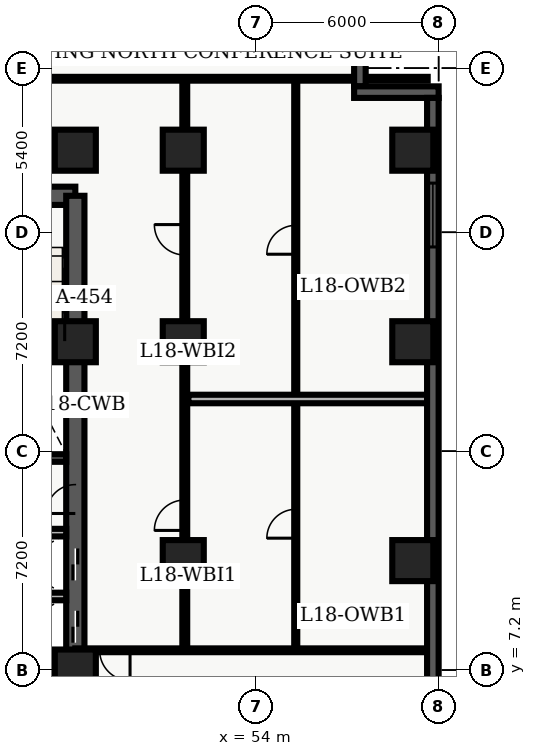
"""IFC4 building model, lengths in metres.
Left out: names, types, materials, properties, quantities, classifications, styles, units other than length and angle.
Written with IfcOpenShell. Run it as: python <this file> out.ifc"""

import sys

from ifc_helpers import new_model, entity, si_unit, converted_unit, direction, frame, origin_with_axes, origin_2d_with_axis, place, context, subcontext, project, spatial, polyline, rectangle, outline, extrude, element, fill, save


model = new_model("IFC4")
c1 = context("Model", 3, precision=1e-05, world=origin_with_axes(), true_north=direction((0.0, 1.0)))
c2 = subcontext(c1, "Body", "Model", "MODEL_VIEW")
j1 = project(units=[si_unit("LENGTHUNIT", "METRE"), converted_unit("PLANEANGLEUNIT", "DEGREE", entity("IfcPlaneAngleMeasure", 0.017), si_unit("PLANEANGLEUNIT", "RADIAN"), dimensions=[0, 0, 0, 0, 0, 0, 0])], contexts=[c1])
p1 = place(None, origin_with_axes())
s1 = spatial("IfcSite", under=j1, at=p1, CompositionType="ELEMENT")
p2 = place(p1, origin_with_axes())
s2 = spatial("IfcBuilding", under=s1, at=p2, CompositionType="ELEMENT")
p3 = place(p2, frame((0.0, 0.0, 75.6), z_axis=(0.0, 0.0, 1.0), x_axis=(1.0, 0.0, 0.0)))
s3 = spatial("IfcBuildingStorey", under=s2, at=p3, CompositionType="ELEMENT", Elevation=75.6)
p4 = place(p3, frame((40.2, 7.2, 0.0), z_axis=(0.0, 0.0, 1.0), x_axis=(1.0, 0.0, 0.0)))
e1 = element("IfcWall", 1, at=p4, inside=s3, PredefinedType="SHEAR", context=c2, shape_type="SweptSolid", body=[
    extrude(outline(polyline([(0.0, -0.3), (7.85, -0.3), (7.85, 0.3), (0.0, 0.3), (0.0, -0.3)])), origin_with_axes(), (0.0, 0.0, 1.0), 3.6),
])
p5 = place(p4, frame((2.175, 0.0, 0.0), z_axis=(0.0, 0.0, 1.0), x_axis=(1.0, 0.0, 0.0)))
e2 = element("IfcOpeningElement", 2, at=p5, cuts=e1, PredefinedType="OPENING", context=c2, shape_type="SweptSolid", body=[
    extrude(rectangle(XDim=1.05, YDim=0.62, at=origin_2d_with_axis()), origin_with_axes(), (0.0, 0.0, 1.0), 2.15),
])
p6 = place(p3, frame((40.2, 22.8, 0.0), z_axis=(0.0, 0.0, 1.0), x_axis=(1.0, 0.0, 0.0)))
e3 = element("IfcWall", 3, at=p6, inside=s3, PredefinedType="SHEAR", context=c2, shape_type="SweptSolid", body=[
    extrude(outline(polyline([(0.0, -0.3), (7.85, -0.3), (7.85, 0.3), (0.0, 0.3), (0.0, -0.3)])), origin_with_axes(), (0.0, 0.0, 1.0), 3.6),
])
p7 = place(p6, frame((5.775, 0.0, 0.0), z_axis=(0.0, 0.0, 1.0), x_axis=(1.0, 0.0, 0.0)))
e4 = element("IfcOpeningElement", 4, at=p7, cuts=e3, PredefinedType="OPENING", context=c2, shape_type="SweptSolid", body=[
    extrude(rectangle(XDim=1.05, YDim=0.62, at=origin_2d_with_axis()), origin_with_axes(), (0.0, 0.0, 1.0), 2.15),
])
p8 = place(p6, frame((2.15, 0.0, 0.0), z_axis=(0.0, 0.0, 1.0), x_axis=(1.0, 0.0, 0.0)))
e5 = element("IfcOpeningElement", 5, at=p8, cuts=e3, PredefinedType="OPENING", context=c2, shape_type="SweptSolid", body=[
    extrude(rectangle(XDim=0.9, YDim=0.62, at=origin_2d_with_axis()), origin_with_axes(), (0.0, 0.0, 1.0), 2.15),
])
p9 = place(p3, frame((48.05, 7.2, 0.0), z_axis=(0.0, 0.0, 1.0), x_axis=(0.0, 1.0, 0.0)))
e6 = element("IfcWall", 6, at=p9, inside=s3, PredefinedType="SHEAR", context=c2, shape_type="SweptSolid", body=[
    extrude(outline(polyline([(0.0, -0.3), (15.6, -0.3), (15.6, 0.3), (0.0, 0.3), (0.0, -0.3)])), origin_with_axes(), (0.0, 0.0, 1.0), 3.6),
])
p10 = place(p9, frame((1.425, 0.0, 0.0), z_axis=(0.0, 0.0, 1.0), x_axis=(1.0, 0.0, 0.0)))
e7 = element("IfcOpeningElement", 7, at=p10, cuts=e6, PredefinedType="OPENING", context=c2, shape_type="SweptSolid", body=[
    extrude(rectangle(XDim=1.05, YDim=0.62, at=origin_2d_with_axis()), origin_with_axes(), (0.0, 0.0, 1.0), 2.15),
])
p11 = place(p9, frame((3.475, 0.0, 0.0), z_axis=(0.0, 0.0, 1.0), x_axis=(1.0, 0.0, 0.0)))
e8 = element("IfcOpeningElement", 8, at=p11, cuts=e6, PredefinedType="OPENING", context=c2, shape_type="SweptSolid", body=[
    extrude(rectangle(XDim=1.05, YDim=0.62, at=origin_2d_with_axis()), origin_with_axes(), (0.0, 0.0, 1.0), 2.15),
])
p12 = place(p9, frame((5.625, 0.0, 0.0), z_axis=(0.0, 0.0, 1.0), x_axis=(1.0, 0.0, 0.0)))
e9 = element("IfcOpeningElement", 9, at=p12, cuts=e6, PredefinedType="OPENING", context=c2, shape_type="SweptSolid", body=[
    extrude(rectangle(XDim=0.95, YDim=0.62, at=origin_2d_with_axis()), origin_with_axes(), (0.0, 0.0, 1.0), 2.15),
])
p13 = place(p3, frame((44.25, 14.175, 0.0), z_axis=(0.0, 0.0, 1.0), x_axis=(1.0, 0.0, 0.0)))
e10 = element("IfcWall", 10, at=p13, inside=s3, PredefinedType="SHEAR", context=c2, shape_type="SweptSolid", body=[
    extrude(outline(polyline([(0.0, -0.125), (3.5, -0.125), (3.5, 0.125), (0.0, 0.125), (0.0, -0.125)])), origin_with_axes(), (0.0, 0.0, 1.0), 3.6),
])
for number, where, z_axis, x_axis in (
    (11, (48.05, 7.2, 0.0), (0.0, 0.0, 1.0), (1.0, 0.0, 0.0)),
    (12, (48.05, 18.0, 0.0), (0.0, 0.0, 1.0), (1.0, 0.0, 0.0)),
    (13, (48.05, 24.3, 0.0), (0.0, 0.0, 1.0), (1.0, 0.0, 0.0)),
    (14, (51.6, 10.8, 0.0), (0.0, 0.0, 1.0), (1.0, 0.0, 0.0)),
    (15, (51.6, 18.0, 0.0), (0.0, 0.0, 1.0), (1.0, 0.0, 0.0)),
    (16, (51.6, 24.3, 0.0), (0.0, 0.0, 1.0), (1.0, 0.0, 0.0)),
    (17, (59.15, 10.8, 0.0), (0.0, 0.0, 1.0), (1.0, 0.0, 0.0)),
    (18, (59.15, 18.0, 0.0), (0.0, 0.0, 1.0), (1.0, 0.0, 0.0)),
    (19, (59.15, 24.3, 0.0), (0.0, 0.0, 1.0), (1.0, 0.0, 0.0)),
):
    element("IfcColumn", number, at=place(p3, frame(where, z_axis=z_axis, x_axis=x_axis)), inside=s3, PredefinedType="COLUMN", context=c2, shape_type="SweptSolid", body=[
        extrude(rectangle(XDim=1.35, YDim=1.35, at=origin_2d_with_axis()), origin_with_axes(), (0.0, 0.0, 1.0), 3.9),
    ])
for number, where, z_axis, x_axis in (
    (20, (44.25, 9.62, 0.0), (0.0, 0.0, 1.0), (1.0, 0.0, 0.0)),
    (21, (44.25, 11.72, 0.0), (0.0, 0.0, 1.0), (1.0, 0.0, 0.0)),
):
    element("IfcWall", number, at=place(p3, frame(where, z_axis=z_axis, x_axis=x_axis)), inside=s3, PredefinedType="SOLIDWALL", context=c2, shape_type="SweptSolid", body=[
        extrude(outline(polyline([(0.0, -0.125), (3.5, -0.125), (3.5, 0.125), (0.0, 0.125), (0.0, -0.125)])), origin_with_axes(), (0.0, 0.0, 1.0), 2.64),
    ])
p14 = place(p3, frame((51.65, 7.85, 0.0), z_axis=(0.0, 0.0, 1.0), x_axis=(0.0, 1.0, 0.0)))
e22 = element("IfcWall", 22, at=p14, inside=s3, PredefinedType="PARTITIONING", context=c2, shape_type="SweptSolid", body=[
    extrude(outline(polyline([(0.0, -0.08), (18.8, -0.08), (18.8, 0.08), (0.0, 0.08), (0.0, -0.08)])), origin_with_axes(), (0.0, 0.0, 1.0), 2.64),
])
p15 = place(p14, frame((4.443, 0.0, 0.0), z_axis=(0.0, 0.0, 1.0), x_axis=(1.0, 0.0, 0.0)))
e23 = element("IfcOpeningElement", 23, at=p15, cuts=e22, PredefinedType="OPENING", context=c2, shape_type="SweptSolid", body=[
    extrude(rectangle(XDim=1.0, YDim=0.18, at=origin_2d_with_axis()), origin_with_axes(), (0.0, 0.0, 1.0), 2.15),
])
p16 = place(p14, frame((13.503, 0.0, 0.0), z_axis=(0.0, 0.0, 1.0), x_axis=(1.0, 0.0, 0.0)))
e24 = element("IfcOpeningElement", 24, at=p16, cuts=e22, PredefinedType="OPENING", context=c2, shape_type="SweptSolid", body=[
    extrude(rectangle(XDim=1.0, YDim=0.18, at=origin_2d_with_axis()), origin_with_axes(), (0.0, 0.0, 1.0), 2.15),
])
p17 = place(p3, frame((59.64, 7.85, 0.0), z_axis=(0.0, 0.0, 1.0), x_axis=(-1.0, 0.0, 0.0)))
e25 = element("IfcWall", 25, at=p17, inside=s3, PredefinedType="PARTITIONING", context=c2, shape_type="SweptSolid", body=[
    extrude(outline(polyline([(0.0, -0.062), (11.59, -0.062), (11.59, 0.062), (0.0, 0.062), (0.0, -0.062)])), origin_with_axes(), (0.0, 0.0, 1.0), 2.64),
])
p18 = place(p17, frame((10.29, 0.0, 0.0), z_axis=(0.0, 0.0, 1.0), x_axis=(1.0, 0.0, 0.0)))
e26 = element("IfcOpeningElement", 26, at=p18, cuts=e25, PredefinedType="OPENING", context=c2, shape_type="SweptSolid", body=[
    extrude(rectangle(XDim=1.0, YDim=0.145, at=origin_2d_with_axis()), origin_with_axes(), (0.0, 0.0, 1.0), 2.15),
])
p19 = place(p3, frame((38.76, 26.65, 0.0), z_axis=(0.0, 0.0, 1.0), x_axis=(1.0, 0.0, 0.0)))
e27 = element("IfcWall", 27, at=p19, inside=s3, PredefinedType="PARTITIONING", context=c2, shape_type="SweptSolid", body=[
    extrude(outline(polyline([(0.0, -0.062), (20.88, -0.062), (20.88, 0.062), (0.0, 0.062), (0.0, -0.062)])), origin_with_axes(), (0.0, 0.0, 1.0), 2.64),
])
p20 = place(p19, frame((4.24, 0.0, 0.0), z_axis=(0.0, 0.0, 1.0), x_axis=(1.0, 0.0, 0.0)))
e28 = element("IfcOpeningElement", 28, at=p20, cuts=e27, PredefinedType="OPENING", context=c2, shape_type="SweptSolid", body=[
    extrude(rectangle(XDim=1.0, YDim=0.145, at=origin_2d_with_axis()), origin_with_axes(), (0.0, 0.0, 1.0), 2.15),
])
p21 = place(p3, frame((55.3, 7.98, 0.0), z_axis=(0.0, 0.0, 1.0), x_axis=(0.0, 1.0, 0.0)))
e29 = element("IfcWall", 29, at=p21, inside=s3, PredefinedType="PARTITIONING", context=c2, shape_type="SweptSolid", body=[
    extrude(outline(polyline([(0.0, -0.05), (18.54, -0.05), (18.54, 0.05), (0.0, 0.05), (0.0, -0.05)])), origin_with_axes(), (0.0, 0.0, 1.0), 2.64),
])
p22 = place(p21, frame((4.033, 0.0, 0.0), z_axis=(0.0, 0.0, 1.0), x_axis=(1.0, 0.0, 0.0)))
e30 = element("IfcOpeningElement", 30, at=p22, cuts=e29, PredefinedType="OPENING", context=c2, shape_type="SweptSolid", body=[
    extrude(rectangle(XDim=0.95, YDim=0.12, at=origin_2d_with_axis()), origin_with_axes(), (0.0, 0.0, 1.0), 2.15),
])
p23 = place(p21, frame((13.373, 0.0, 0.0), z_axis=(0.0, 0.0, 1.0), x_axis=(1.0, 0.0, 0.0)))
e31 = element("IfcOpeningElement", 31, at=p23, cuts=e29, PredefinedType="OPENING", context=c2, shape_type="SweptSolid", body=[
    extrude(rectangle(XDim=0.95, YDim=0.12, at=origin_2d_with_axis()), origin_with_axes(), (0.0, 0.0, 1.0), 2.15),
])
p24 = place(p3, frame((51.77, 16.116, 0.0), z_axis=(0.0, 0.0, 1.0), x_axis=(1.0, 0.0, 0.0)))
e32 = element("IfcWall", 32, at=p24, inside=s3, PredefinedType="PARTITIONING", context=c2, shape_type="SweptSolid", body=[
    extrude(outline(polyline([(0.0, -0.14), (7.855, -0.14), (7.855, 0.14), (0.0, 0.14), (0.0, -0.14)])), origin_with_axes(), (0.0, 0.0, 1.0), 2.64),
])
p25 = place(p3, frame((57.41, 28.42, 0.0), z_axis=(0.0, 0.0, 1.0), x_axis=(0.0, -1.0, 0.0)))
e33 = element("IfcWall", 33, at=p25, inside=s3, PredefinedType="SOLIDWALL", context=c2, shape_type="SweptSolid", body=[
    extrude(outline(polyline([(0.0, -0.19), (2.02, -0.19), (2.02, 0.19), (0.0, 0.19), (0.0, -0.19)])), origin_with_axes(), (0.0, 0.0, 1.0), 3.6),
])
p26 = place(p3, frame((57.22, 26.21, 0.0), z_axis=(0.0, 0.0, 1.0), x_axis=(1.0, 0.0, 0.0)))
e34 = element("IfcWall", 34, at=p26, inside=s3, PredefinedType="SOLIDWALL", context=c2, shape_type="SweptSolid", body=[
    extrude(outline(polyline([(0.0, -0.19), (2.78, -0.19), (2.78, 0.19), (0.0, 0.19), (0.0, -0.19)])), origin_with_axes(), (0.0, 0.0, 1.0), 3.6),
])
p27 = place(p3, frame((59.81, 26.02, 0.0), z_axis=(0.0, 0.0, 1.0), x_axis=(0.0, -1.0, 0.0)))
e35 = element("IfcWall", 35, at=p27, inside=s3, PredefinedType="SOLIDWALL", context=c2, shape_type="SweptSolid", body=[
    extrude(outline(polyline([(0.0, -0.19), (23.62, -0.19), (23.62, 0.19), (0.0, 0.19), (0.0, -0.19)])), origin_with_axes(), (0.0, 0.0, 1.0), 3.6),
])
p28 = place(p27, frame((3.853, 0.0, 0.45), z_axis=(0.0, 0.0, 1.0), x_axis=(1.0, 0.0, 0.0)))
e36 = element("IfcOpeningElement", 36, at=p28, cuts=e35, PredefinedType="OPENING", context=c2, shape_type="SweptSolid", body=[
    extrude(rectangle(XDim=2.1, YDim=0.4, at=origin_2d_with_axis()), origin_with_axes(), (0.0, 0.0, 1.0), 2.2),
])
p29 = place(p27, frame((20.218, 0.0, 0.45), z_axis=(0.0, 0.0, 1.0), x_axis=(1.0, 0.0, 0.0)))
e37 = element("IfcOpeningElement", 37, at=p29, cuts=e35, PredefinedType="OPENING", context=c2, shape_type="SweptSolid", body=[
    extrude(rectangle(XDim=2.1, YDim=0.4, at=origin_2d_with_axis()), origin_with_axes(), (0.0, 0.0, 1.0), 2.2),
])
p30 = place(p9, frame((1.425, 0.0, 0.0), z_axis=(0.0, 0.0, 1.0), x_axis=(1.0, 0.0, 0.0)))
e38 = element("IfcDoor", 38, at=p30, inside=s3, OperationType="SLIDING_TO_LEFT", PredefinedType="DOOR", context=c2, shape_type="SweptSolid", body=[
    extrude(rectangle(XDim=1.05, YDim=0.09, at=origin_2d_with_axis()), origin_with_axes(), (0.0, 0.0, 1.0), 2.15),
])
fill(e7, e38)
p31 = place(p9, frame((3.475, 0.0, 0.0), z_axis=(0.0, 0.0, 1.0), x_axis=(1.0, 0.0, 0.0)))
e39 = element("IfcDoor", 39, at=p31, inside=s3, OperationType="SLIDING_TO_RIGHT", PredefinedType="DOOR", context=c2, shape_type="SweptSolid", body=[
    extrude(rectangle(XDim=1.05, YDim=0.09, at=origin_2d_with_axis()), origin_with_axes(), (0.0, 0.0, 1.0), 2.15),
])
fill(e8, e39)
p32 = place(p9, frame((5.625, 0.0, 0.0), z_axis=(0.0, 0.0, 1.0), x_axis=(1.0, 0.0, 0.0)))
e40 = element("IfcDoor", 40, at=p32, inside=s3, OperationType="SINGLE_SWING_LEFT", PredefinedType="DOOR", context=c2, shape_type="SweptSolid", body=[
    extrude(rectangle(XDim=0.95, YDim=0.09, at=origin_2d_with_axis()), origin_with_axes(), (0.0, 0.0, 1.0), 2.15),
])
fill(e9, e40)
p33 = place(p17, frame((10.29, 0.0, 0.0), z_axis=(0.0, 0.0, 1.0), x_axis=(1.0, 0.0, 0.0)))
e41 = element("IfcDoor", 41, at=p33, inside=s3, OperationType="SINGLE_SWING_LEFT", PredefinedType="DOOR", context=c2, shape_type="SweptSolid", body=[
    extrude(rectangle(XDim=1.0, YDim=0.075, at=origin_2d_with_axis()), origin_with_axes(), (0.0, 0.0, 1.0), 2.15),
])
fill(e26, e41)
p34 = place(p21, frame((4.033, 0.0, 0.0), z_axis=(0.0, 0.0, 1.0), x_axis=(1.0, 0.0, 0.0)))
e42 = element("IfcDoor", 42, at=p34, inside=s3, OperationType="SINGLE_SWING_LEFT", PredefinedType="DOOR", context=c2, shape_type="SweptSolid", body=[
    extrude(rectangle(XDim=0.95, YDim=0.06, at=origin_2d_with_axis()), origin_with_axes(), (0.0, 0.0, 1.0), 2.15),
])
fill(e30, e42)
p35 = place(p14, frame((4.443, 0.0, 0.0), z_axis=(0.0, 0.0, 1.0), x_axis=(1.0, 0.0, 0.0)))
e43 = element("IfcDoor", 43, at=p35, inside=s3, OperationType="SINGLE_SWING_LEFT", PredefinedType="DOOR", context=c2, shape_type="SweptSolid", body=[
    extrude(rectangle(XDim=1.0, YDim=0.09, at=origin_2d_with_axis()), origin_with_axes(), (0.0, 0.0, 1.0), 2.15),
])
fill(e23, e43)
p36 = place(p21, frame((13.373, 0.0, 0.0), z_axis=(0.0, 0.0, 1.0), x_axis=(1.0, 0.0, 0.0)))
e44 = element("IfcDoor", 44, at=p36, inside=s3, OperationType="SINGLE_SWING_LEFT", PredefinedType="DOOR", context=c2, shape_type="SweptSolid", body=[
    extrude(rectangle(XDim=0.95, YDim=0.06, at=origin_2d_with_axis()), origin_with_axes(), (0.0, 0.0, 1.0), 2.15),
])
fill(e31, e44)
p37 = place(p14, frame((13.503, 0.0, 0.0), z_axis=(0.0, 0.0, 1.0), x_axis=(1.0, 0.0, 0.0)))
e45 = element("IfcDoor", 45, at=p37, inside=s3, OperationType="SINGLE_SWING_RIGHT", PredefinedType="DOOR", context=c2, shape_type="SweptSolid", body=[
    extrude(rectangle(XDim=1.0, YDim=0.09, at=origin_2d_with_axis()), origin_with_axes(), (0.0, 0.0, 1.0), 2.15),
])
fill(e24, e45)
p38 = place(p27, frame((3.853, 0.0, 0.45), z_axis=(0.0, 0.0, 1.0), x_axis=(1.0, 0.0, 0.0)))
e46 = element("IfcWindow", 46, at=p38, inside=s3, PredefinedType="WINDOW", context=c2, shape_type="SweptSolid", body=[
    extrude(rectangle(XDim=2.1, YDim=0.09, at=origin_2d_with_axis()), origin_with_axes(), (0.0, 0.0, 1.0), 2.2),
])
fill(e36, e46)
save(model, sys.argv[1])
